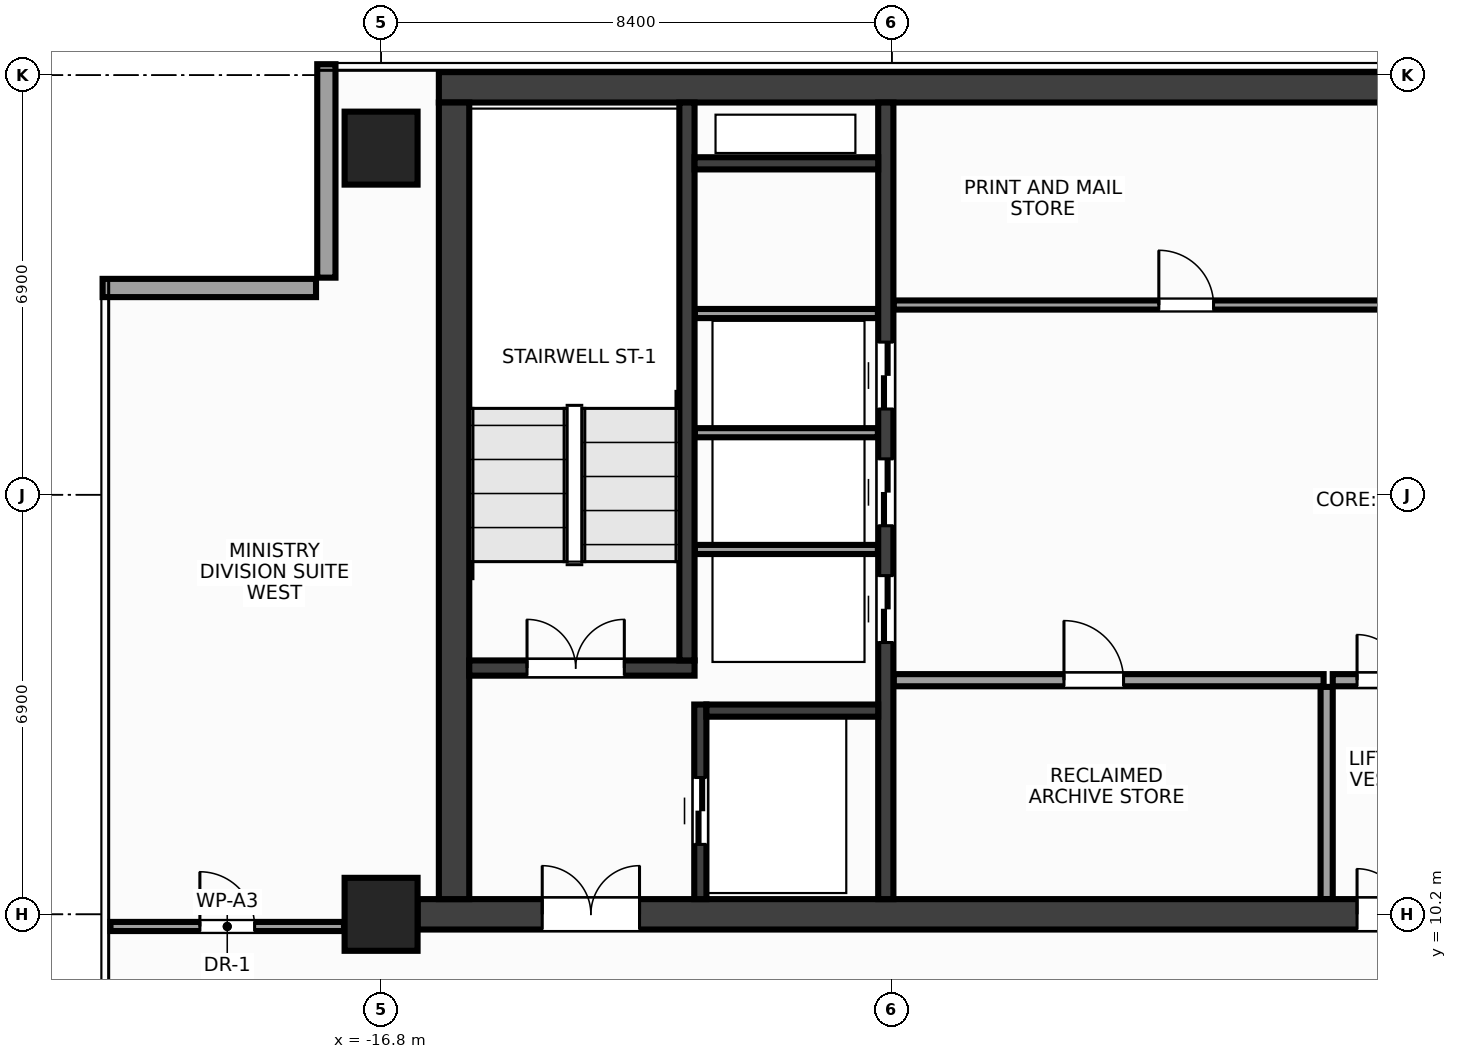
"""IFC4 building model, lengths in metres.
Left out: names, types, materials, properties, quantities, classifications, styles, units other than length and angle.
Written with IfcOpenShell. Run it as: python <this file> out.ifc"""

import sys

from ifc_helpers import new_model, si_unit, direction, frame, frame_2d, origin, origin_2d, place, context, subcontext, project, spatial, rectangle, extrude, source, transform, mapped, element, fill, save


model = new_model("IFC4")
c1 = context("Model", 3, precision=1e-05, world=origin(), true_north=direction((0.0, 1.0)))
c2 = subcontext(c1, "Body", "Model", "MODEL_VIEW")
j1 = project(units=[si_unit("LENGTHUNIT", "METRE"), si_unit("PLANEANGLEUNIT", "RADIAN")], contexts=[c1])
p1 = place(None, origin())
s1 = spatial("IfcSite", under=j1, at=p1, CompositionType="ELEMENT")
p2 = place(p1, origin())
s2 = spatial("IfcBuilding", under=s1, at=p2, CompositionType="ELEMENT")
p3 = place(p2, frame((0.0, 0.0, 282.8)))
s3 = spatial("IfcBuildingStorey", under=s2, at=p3, CompositionType="ELEMENT", Elevation=282.8)
m1 = source(origin(), c2, "Body", "SweptSolid", [
    extrude(rectangle(XDim=31.7, YDim=0.5, at=frame_2d((15.85, 0.0))), origin(), (0.0, 0.0, 1.0), 3.6),
])
p4 = place(p3, frame((-15.85, 23.8, 0.0), z_axis=(0.0, 0.0, 1.0), x_axis=(1.0, 0.0, 0.0)))
e1 = element("IfcWall", 1, at=p4, inside=s3, PredefinedType="SHEAR", context=c2, shape_type="MappedRepresentation", body=[
    mapped(m1, transform((0.0, 0.0, 0.0), x_axis=(1.0, 0.0, 0.0), y_axis=(0.0, 1.0, 0.0), z_axis=(0.0, 0.0, 1.0), scale=1.0)),
])
m2 = source(origin(), c2, "Body", "SweptSolid", [
    extrude(rectangle(XDim=32.4, YDim=0.5, at=frame_2d((16.2, 0.0))), origin(), (0.0, 0.0, 1.0), 3.6),
])
p5 = place(p3, frame((-16.2, 10.2, 0.0), z_axis=(0.0, 0.0, 1.0), x_axis=(1.0, 0.0, 0.0)))
e2 = element("IfcWall", 2, at=p5, inside=s3, PredefinedType="SHEAR", context=c2, shape_type="MappedRepresentation", body=[
    mapped(m2, transform((0.0, 0.0, 0.0), x_axis=(1.0, 0.0, 0.0), y_axis=(0.0, 1.0, 0.0), z_axis=(0.0, 0.0, 1.0), scale=1.0)),
])
p6 = place(p5, frame((2.05, 0.0, 0.0)))
e3 = element("IfcOpeningElement", 3, at=p6, cuts=e2, PredefinedType="OPENING", context=c2, shape_type="SweptSolid", body=[
    extrude(rectangle(XDim=1.6, YDim=2.15, at=frame_2d((0.8, 1.075))), frame((0.0, 0.262, 0.0), z_axis=(0.0, -1.0, 0.0), x_axis=(1.0, 0.0, 0.0)), (0.0, 0.0, 1.0), 0.524),
])
p7 = place(p5, frame((28.75, 0.0, 0.0)))
e4 = element("IfcOpeningElement", 4, at=p7, cuts=e2, PredefinedType="OPENING", context=c2, shape_type="SweptSolid", body=[
    extrude(rectangle(XDim=1.6, YDim=2.15, at=frame_2d((0.8, 1.075))), frame((0.0, 0.262, 0.0), z_axis=(0.0, -1.0, 0.0), x_axis=(1.0, 0.0, 0.0)), (0.0, 0.0, 1.0), 0.524),
])
p8 = place(p5, frame((15.45, 0.0, 0.0)))
e5 = element("IfcOpeningElement", 5, at=p8, cuts=e2, PredefinedType="OPENING", context=c2, shape_type="SweptSolid", body=[
    extrude(rectangle(XDim=1.5, YDim=2.2, at=frame_2d((0.75, 1.1))), frame((0.0, 0.262, 0.0), z_axis=(0.0, -1.0, 0.0), x_axis=(1.0, 0.0, 0.0)), (0.0, 0.0, 1.0), 0.524),
])
m3 = source(origin(), c2, "Body", "SweptSolid", [
    extrude(rectangle(XDim=13.1, YDim=0.5, at=frame_2d((6.55, 0.0))), origin(), (0.0, 0.0, 1.0), 3.6),
])
p9 = place(p3, frame((-15.6, 10.45, 0.0), z_axis=(0.0, 0.0, 1.0), x_axis=(0.0, 1.0, 0.0)))
e6 = element("IfcWall", 6, at=p9, inside=s3, PredefinedType="SHEAR", context=c2, shape_type="MappedRepresentation", body=[
    mapped(m3, transform((0.0, 0.0, 0.0), x_axis=(1.0, 0.0, 0.0), y_axis=(0.0, 1.0, 0.0), z_axis=(0.0, 0.0, 1.0), scale=1.0)),
])
m4 = source(origin(), c2, "Body", "SweptSolid", [
    extrude(rectangle(XDim=13.1, YDim=0.25, at=frame_2d((6.55, 0.0))), origin(), (0.0, 0.0, 1.0), 3.6),
])
p10 = place(p3, frame((-8.5, 10.45, 0.0), z_axis=(0.0, 0.0, 1.0), x_axis=(0.0, 1.0, 0.0)))
e7 = element("IfcWall", 7, at=p10, inside=s3, PredefinedType="SHEAR", context=c2, shape_type="MappedRepresentation", body=[
    mapped(m4, transform((0.0, 0.0, 0.0), x_axis=(1.0, 0.0, 0.0), y_axis=(0.0, 1.0, 0.0), z_axis=(0.0, 0.0, 1.0), scale=1.0)),
])
p11 = place(p10, frame((4.22, 0.0, 0.0)))
e8 = element("IfcOpeningElement", 8, at=p11, cuts=e7, PredefinedType="OPENING", context=c2, shape_type="SweptSolid", body=[
    extrude(rectangle(XDim=1.1, YDim=2.15, at=frame_2d((0.55, 1.075))), frame((0.0, 0.137, 0.0), z_axis=(0.0, -1.0, 0.0), x_axis=(1.0, 0.0, 0.0)), (0.0, 0.0, 1.0), 0.274),
])
p12 = place(p10, frame((6.14, 0.0, 0.0)))
e9 = element("IfcOpeningElement", 9, at=p12, cuts=e7, PredefinedType="OPENING", context=c2, shape_type="SweptSolid", body=[
    extrude(rectangle(XDim=1.1, YDim=2.15, at=frame_2d((0.55, 1.075))), frame((0.0, 0.137, 0.0), z_axis=(0.0, -1.0, 0.0), x_axis=(1.0, 0.0, 0.0)), (0.0, 0.0, 1.0), 0.274),
])
p13 = place(p10, frame((8.06, 0.0, 0.0)))
e10 = element("IfcOpeningElement", 10, at=p13, cuts=e7, PredefinedType="OPENING", context=c2, shape_type="SweptSolid", body=[
    extrude(rectangle(XDim=1.1, YDim=2.15, at=frame_2d((0.55, 1.075))), frame((0.0, 0.137, 0.0), z_axis=(0.0, -1.0, 0.0), x_axis=(1.0, 0.0, 0.0)), (0.0, 0.0, 1.0), 0.274),
])
m5 = source(origin(), c2, "Body", "SweptSolid", [
    extrude(rectangle(XDim=3.705, YDim=0.25, at=frame_2d((1.853, 0.0))), origin(), (0.0, 0.0, 1.0), 3.6),
])
p14 = place(p3, frame((-15.35, 14.25, 0.0), z_axis=(0.0, 0.0, 1.0), x_axis=(1.0, 0.0, 0.0)))
e11 = element("IfcWall", 11, at=p14, inside=s3, PredefinedType="SHEAR", context=c2, shape_type="MappedRepresentation", body=[
    mapped(m5, transform((0.0, 0.0, 0.0), x_axis=(1.0, 0.0, 0.0), y_axis=(0.0, 1.0, 0.0), z_axis=(0.0, 0.0, 1.0), scale=1.0)),
])
p15 = place(p14, frame((0.95, 0.0, 0.0)))
e12 = element("IfcOpeningElement", 12, at=p15, cuts=e11, PredefinedType="OPENING", context=c2, shape_type="SweptSolid", body=[
    extrude(rectangle(XDim=1.6, YDim=2.15, at=frame_2d((0.8, 1.075))), frame((0.0, 0.137, 0.0), z_axis=(0.0, -1.0, 0.0), x_axis=(1.0, 0.0, 0.0)), (0.0, 0.0, 1.0), 0.274),
])
m6 = source(origin(), c2, "Body", "SweptSolid", [
    extrude(rectangle(XDim=9.175, YDim=0.25, at=frame_2d((4.587, 0.0))), origin(), (0.0, 0.0, 1.0), 3.6),
])
p16 = place(p3, frame((-11.77, 14.375, 0.0), z_axis=(0.0, 0.0, 1.0), x_axis=(0.0, 1.0, 0.0)))
e13 = element("IfcWall", 13, at=p16, inside=s3, PredefinedType="SHEAR", context=c2, shape_type="MappedRepresentation", body=[
    mapped(m6, transform((0.0, 0.0, 0.0), x_axis=(1.0, 0.0, 0.0), y_axis=(0.0, 1.0, 0.0), z_axis=(0.0, 0.0, 1.0), scale=1.0)),
])
m7 = source(origin(), c2, "Body", "SweptSolid", [
    extrude(rectangle(XDim=3.2, YDim=0.2, at=frame_2d((1.6, 0.0))), origin(), (0.0, 0.0, 1.0), 3.6),
])
p17 = place(p3, frame((-11.55, 10.45, 0.0), z_axis=(0.0, 0.0, 1.0), x_axis=(0.0, 1.0, 0.0)))
e14 = element("IfcWall", 14, at=p17, inside=s3, PredefinedType="SHEAR", context=c2, shape_type="MappedRepresentation", body=[
    mapped(m7, transform((0.0, 0.0, 0.0), x_axis=(1.0, 0.0, 0.0), y_axis=(0.0, 1.0, 0.0), z_axis=(0.0, 0.0, 1.0), scale=1.0)),
])
p18 = place(p17, frame((0.9, 0.0, 0.0)))
e15 = element("IfcOpeningElement", 15, at=p18, cuts=e14, PredefinedType="OPENING", context=c2, shape_type="SweptSolid", body=[
    extrude(rectangle(XDim=1.1, YDim=2.15, at=frame_2d((0.55, 1.075))), frame((0.0, 0.112, 0.0), z_axis=(0.0, -1.0, 0.0), x_axis=(1.0, 0.0, 0.0)), (0.0, 0.0, 1.0), 0.224),
])
m8 = source(origin(), c2, "Body", "SweptSolid", [
    extrude(rectangle(XDim=2.825, YDim=0.2, at=frame_2d((1.413, 0.0))), origin(), (0.0, 0.0, 1.0), 3.6),
])
p19 = place(p3, frame((-11.45, 13.55, 0.0), z_axis=(0.0, 0.0, 1.0), x_axis=(1.0, 0.0, 0.0)))
e16 = element("IfcWall", 16, at=p19, inside=s3, PredefinedType="SHEAR", context=c2, shape_type="MappedRepresentation", body=[
    mapped(m8, transform((0.0, 0.0, 0.0), x_axis=(1.0, 0.0, 0.0), y_axis=(0.0, 1.0, 0.0), z_axis=(0.0, 0.0, 1.0), scale=1.0)),
])
m9 = source(origin(), c2, "Body", "SweptSolid", [
    extrude(rectangle(XDim=3.02, YDim=0.2, at=frame_2d((1.51, 0.0))), origin(), (0.0, 0.0, 1.0), 3.6),
])
p20 = place(p3, frame((-11.645, 22.55, 0.0), z_axis=(0.0, 0.0, 1.0), x_axis=(1.0, 0.0, 0.0)))
e17 = element("IfcWall", 17, at=p20, inside=s3, PredefinedType="SHEAR", context=c2, shape_type="MappedRepresentation", body=[
    mapped(m9, transform((0.0, 0.0, 0.0), x_axis=(1.0, 0.0, 0.0), y_axis=(0.0, 1.0, 0.0), z_axis=(0.0, 0.0, 1.0), scale=1.0)),
])
m10 = source(origin(), c2, "Body", "SweptSolid", [
    extrude(rectangle(XDim=1.2, YDim=1.2, at=origin_2d()), origin(), (0.0, 0.0, 1.0), 3.6),
])
for number, where, z_axis, x_axis in (
    (18, (-16.8, 10.2, 0.0), (0.0, 0.0, 1.0), (1.0, 0.0, 0.0)),
    (19, (-16.8, 22.8, 0.0), (0.0, 0.0, 1.0), (1.0, 0.0, 0.0)),
):
    element("IfcColumn", number, at=place(p3, frame(where, z_axis=z_axis, x_axis=x_axis)), inside=s3, PredefinedType="COLUMN", context=c2, shape_type="MappedRepresentation", body=[
        mapped(m10, transform((0.0, 0.0, 0.0), x_axis=(1.0, 0.0, 0.0), y_axis=(0.0, 1.0, 0.0), z_axis=(0.0, 0.0, 1.0), scale=1.0)),
    ])
m11 = source(origin(), c2, "Body", "SweptSolid", [
    extrude(rectangle(XDim=3.51, YDim=0.3, at=frame_2d((1.755, 0.0))), origin(), (0.0, 0.0, 1.0), 2.75),
])
p21 = place(p3, frame((-17.7, 24.18, 0.0), z_axis=(0.0, 0.0, 1.0), x_axis=(0.0, -1.0, 0.0)))
e20 = element("IfcWall", 20, at=p21, inside=s3, PredefinedType="STANDARD", context=c2, shape_type="MappedRepresentation", body=[
    mapped(m11, transform((0.0, 0.0, 0.0), x_axis=(1.0, 0.0, 0.0), y_axis=(0.0, 1.0, 0.0), z_axis=(0.0, 0.0, 1.0), scale=1.0)),
])
m12 = source(origin(), c2, "Body", "SweptSolid", [
    extrude(rectangle(XDim=3.51, YDim=0.3, at=frame_2d((1.755, 0.0))), origin(), (0.0, 0.0, 1.0), 2.75),
])
p22 = place(p3, frame((-17.87, 20.5, 0.0), z_axis=(0.0, 0.0, 1.0), x_axis=(-1.0, 0.0, 0.0)))
e21 = element("IfcWall", 21, at=p22, inside=s3, PredefinedType="STANDARD", context=c2, shape_type="MappedRepresentation", body=[
    mapped(m12, transform((0.0, 0.0, 0.0), x_axis=(1.0, 0.0, 0.0), y_axis=(0.0, 1.0, 0.0), z_axis=(0.0, 0.0, 1.0), scale=1.0)),
])
m13 = source(origin(), c2, "Body", "SweptSolid", [
    extrude(rectangle(XDim=3.01, YDim=0.15, at=frame_2d((1.505, 0.0))), origin(), (0.0, 0.0, 1.0), 3.37),
])
for number, where, z_axis, x_axis in (
    (22, (-11.64, 16.2, 0.0), (0.0, 0.0, 1.0), (1.0, 0.0, 0.0)),
    (23, (-11.64, 18.12, 0.0), (0.0, 0.0, 1.0), (1.0, 0.0, 0.0)),
    (24, (-11.64, 20.08, 0.0), (0.0, 0.0, 1.0), (1.0, 0.0, 0.0)),
):
    element("IfcWall", number, at=place(p3, frame(where, z_axis=z_axis, x_axis=x_axis)), inside=s3, PredefinedType="PARTITIONING", context=c2, shape_type="MappedRepresentation", body=[
        mapped(m13, transform((0.0, 0.0, 0.0), x_axis=(1.0, 0.0, 0.0), y_axis=(0.0, 1.0, 0.0), z_axis=(0.0, 0.0, 1.0), scale=1.0)),
    ])
m14 = source(origin(), c2, "Body", "SweptSolid", [
    extrude(rectangle(XDim=7.07, YDim=0.2, at=frame_2d((3.535, 0.0))), origin(), (0.0, 0.0, 1.0), 3.37),
])
p23 = place(p3, frame((-8.37, 14.05, 0.0), z_axis=(0.0, 0.0, 1.0), x_axis=(1.0, 0.0, 0.0)))
e25 = element("IfcWall", 25, at=p23, inside=s3, PredefinedType="PARTITIONING", context=c2, shape_type="MappedRepresentation", body=[
    mapped(m14, transform((0.0, 0.0, 0.0), x_axis=(1.0, 0.0, 0.0), y_axis=(0.0, 1.0, 0.0), z_axis=(0.0, 0.0, 1.0), scale=1.0)),
])
p24 = place(p23, frame((2.8, 0.0, 0.0)))
e26 = element("IfcOpeningElement", 26, at=p24, cuts=e25, PredefinedType="OPENING", context=c2, shape_type="SweptSolid", body=[
    extrude(rectangle(XDim=0.98, YDim=2.15, at=frame_2d((0.49, 1.075))), frame((0.0, 0.112, 0.0), z_axis=(0.0, -1.0, 0.0), x_axis=(1.0, 0.0, 0.0)), (0.0, 0.0, 1.0), 0.224),
])
m15 = source(origin(), c2, "Body", "SweptSolid", [
    extrude(rectangle(XDim=3.49, YDim=0.2, at=frame_2d((1.745, 0.0))), origin(), (0.0, 0.0, 1.0), 3.37),
])
p25 = place(p3, frame((-1.25, 10.45, 0.0), z_axis=(0.0, 0.0, 1.0), x_axis=(0.0, 1.0, 0.0)))
e27 = element("IfcWall", 27, at=p25, inside=s3, PredefinedType="PARTITIONING", context=c2, shape_type="MappedRepresentation", body=[
    mapped(m15, transform((0.0, 0.0, 0.0), x_axis=(1.0, 0.0, 0.0), y_axis=(0.0, 1.0, 0.0), z_axis=(0.0, 0.0, 1.0), scale=1.0)),
])
m16 = source(origin(), c2, "Body", "SweptSolid", [
    extrude(rectangle(XDim=2.3, YDim=0.2, at=frame_2d((1.15, 0.0))), origin(), (0.0, 0.0, 1.0), 3.37),
])
p26 = place(p3, frame((-1.15, 14.05, 0.0), z_axis=(0.0, 0.0, 1.0), x_axis=(1.0, 0.0, 0.0)))
e28 = element("IfcWall", 28, at=p26, inside=s3, PredefinedType="PARTITIONING", context=c2, shape_type="MappedRepresentation", body=[
    mapped(m16, transform((0.0, 0.0, 0.0), x_axis=(1.0, 0.0, 0.0), y_axis=(0.0, 1.0, 0.0), z_axis=(0.0, 0.0, 1.0), scale=1.0)),
])
p27 = place(p26, frame((0.4, 0.0, 0.0)))
e29 = element("IfcOpeningElement", 29, at=p27, cuts=e28, PredefinedType="OPENING", context=c2, shape_type="SweptSolid", body=[
    extrude(rectangle(XDim=1.5, YDim=2.2, at=frame_2d((0.75, 1.1))), frame((0.0, 0.112, 0.0), z_axis=(0.0, -1.0, 0.0), x_axis=(1.0, 0.0, 0.0)), (0.0, 0.0, 1.0), 0.224),
])
m17 = source(origin(), c2, "Body", "SweptSolid", [
    extrude(rectangle(XDim=14.59, YDim=0.15, at=frame_2d((7.295, 0.0))), origin(), (0.0, 0.0, 1.0), 3.37),
])
p28 = place(p3, frame((-8.37, 20.22, 0.0), z_axis=(0.0, 0.0, 1.0), x_axis=(1.0, 0.0, 0.0)))
e30 = element("IfcWall", 30, at=p28, inside=s3, PredefinedType="PARTITIONING", context=c2, shape_type="MappedRepresentation", body=[
    mapped(m17, transform((0.0, 0.0, 0.0), x_axis=(1.0, 0.0, 0.0), y_axis=(0.0, 1.0, 0.0), z_axis=(0.0, 0.0, 1.0), scale=1.0)),
])
p29 = place(p28, frame((4.36, 0.0, 0.0)))
e31 = element("IfcOpeningElement", 31, at=p29, cuts=e30, PredefinedType="OPENING", context=c2, shape_type="SweptSolid", body=[
    extrude(rectangle(XDim=0.9, YDim=2.15, at=frame_2d((0.45, 1.075))), frame((0.0, 0.087, 0.0), z_axis=(0.0, -1.0, 0.0), x_axis=(1.0, 0.0, 0.0)), (0.0, 0.0, 1.0), 0.174),
])
p30 = place(p28, frame((10.32, 0.0, 0.0)))
e32 = element("IfcOpeningElement", 32, at=p30, cuts=e30, PredefinedType="OPENING", context=c2, shape_type="SweptSolid", body=[
    extrude(rectangle(XDim=0.9, YDim=2.15, at=frame_2d((0.45, 1.075))), frame((0.0, 0.087, 0.0), z_axis=(0.0, -1.0, 0.0), x_axis=(1.0, 0.0, 0.0)), (0.0, 0.0, 1.0), 0.174),
])
p31 = place(p28, frame((12.77, 0.0, 0.0)))
e33 = element("IfcOpeningElement", 33, at=p31, cuts=e30, PredefinedType="OPENING", context=c2, shape_type="SweptSolid", body=[
    extrude(rectangle(XDim=0.9, YDim=2.15, at=frame_2d((0.45, 1.075))), frame((0.0, 0.087, 0.0), z_axis=(0.0, -1.0, 0.0), x_axis=(1.0, 0.0, 0.0)), (0.0, 0.0, 1.0), 0.174),
])
m18 = source(origin(), c2, "Body", "SweptSolid", [
    extrude(rectangle(XDim=3.84, YDim=0.15, at=frame_2d((1.92, 0.0))), origin(), (0.0, 0.0, 1.0), 2.805),
])
p32 = place(p3, frame((-21.25, 10.0, 0.0), z_axis=(0.0, 0.0, 1.0), x_axis=(1.0, 0.0, 0.0)))
e34 = element("IfcWall", 34, at=p32, inside=s3, PredefinedType="PARTITIONING", context=c2, shape_type="MappedRepresentation", body=[
    mapped(m18, transform((0.0, 0.0, 0.0), x_axis=(1.0, 0.0, 0.0), y_axis=(0.0, 1.0, 0.0), z_axis=(0.0, 0.0, 1.0), scale=1.0)),
])
p33 = place(p32, frame((1.47, 0.0, 0.0)))
e35 = element("IfcOpeningElement", 35, at=p33, cuts=e34, PredefinedType="OPENING", context=c2, shape_type="SweptSolid", body=[
    extrude(rectangle(XDim=0.9, YDim=2.15, at=frame_2d((0.45, 1.075))), frame((0.0, 0.087, 0.0), z_axis=(0.0, -1.0, 0.0), x_axis=(1.0, 0.0, 0.0)), (0.0, 0.0, 1.0), 0.174),
])
m19 = source(origin(), c2, "Body", "SweptSolid", [
    extrude(rectangle(XDim=1.6, YDim=2.15, at=frame_2d((0.8, 1.075))), frame((0.0, 0.025, 0.0), z_axis=(0.0, -1.0, 0.0), x_axis=(1.0, 0.0, 0.0)), (0.0, 0.0, 1.0), 0.05),
])
p34 = place(p15, origin())
e36 = element("IfcDoor", 36, at=p34, inside=s3, OperationType="DOUBLE_DOOR_SINGLE_SWING", PredefinedType="DOOR", context=c2, shape_type="MappedRepresentation", body=[
    mapped(m19, transform((0.0, 0.0, 0.0), x_axis=(1.0, 0.0, 0.0), y_axis=(0.0, 1.0, 0.0), z_axis=(0.0, 0.0, 1.0), scale=1.0)),
])
fill(e12, e36)
p35 = place(p6, origin())
e37 = element("IfcDoor", 37, at=p35, inside=s3, OperationType="DOUBLE_DOOR_SINGLE_SWING", PredefinedType="DOOR", context=c2, shape_type="MappedRepresentation", body=[
    mapped(m19, transform((0.0, 0.0, 0.0), x_axis=(1.0, 0.0, 0.0), y_axis=(0.0, 1.0, 0.0), z_axis=(0.0, 0.0, 1.0), scale=1.0)),
])
fill(e3, e37)
m20 = source(origin(), c2, "Body", "SweptSolid", [
    extrude(rectangle(XDim=1.1, YDim=2.15, at=frame_2d((0.55, 1.075))), frame((0.0, 0.025, 0.0), z_axis=(0.0, -1.0, 0.0), x_axis=(1.0, 0.0, 0.0)), (0.0, 0.0, 1.0), 0.05),
])
p36 = place(p18, origin())
e38 = element("IfcDoor", 38, at=p36, inside=s3, OperationType="DOUBLE_DOOR_SLIDING", PredefinedType="DOOR", context=c2, shape_type="MappedRepresentation", body=[
    mapped(m20, transform((0.0, 0.0, 0.0), x_axis=(1.0, 0.0, 0.0), y_axis=(0.0, 1.0, 0.0), z_axis=(0.0, 0.0, 1.0), scale=1.0)),
])
fill(e15, e38)
p37 = place(p11, origin())
e39 = element("IfcDoor", 39, at=p37, inside=s3, OperationType="DOUBLE_DOOR_SLIDING", PredefinedType="DOOR", context=c2, shape_type="MappedRepresentation", body=[
    mapped(m20, transform((0.0, 0.0, 0.0), x_axis=(1.0, 0.0, 0.0), y_axis=(0.0, 1.0, 0.0), z_axis=(0.0, 0.0, 1.0), scale=1.0)),
])
fill(e8, e39)
p38 = place(p12, origin())
e40 = element("IfcDoor", 40, at=p38, inside=s3, OperationType="DOUBLE_DOOR_SLIDING", PredefinedType="DOOR", context=c2, shape_type="MappedRepresentation", body=[
    mapped(m20, transform((0.0, 0.0, 0.0), x_axis=(1.0, 0.0, 0.0), y_axis=(0.0, 1.0, 0.0), z_axis=(0.0, 0.0, 1.0), scale=1.0)),
])
fill(e9, e40)
p39 = place(p13, origin())
e41 = element("IfcDoor", 41, at=p39, inside=s3, OperationType="DOUBLE_DOOR_SLIDING", PredefinedType="DOOR", context=c2, shape_type="MappedRepresentation", body=[
    mapped(m20, transform((0.0, 0.0, 0.0), x_axis=(1.0, 0.0, 0.0), y_axis=(0.0, 1.0, 0.0), z_axis=(0.0, 0.0, 1.0), scale=1.0)),
])
fill(e10, e41)
m21 = source(origin(), c2, "Body", "SweptSolid", [
    extrude(rectangle(XDim=0.98, YDim=2.15, at=frame_2d((0.49, 1.075))), frame((0.0, 0.025, 0.0), z_axis=(0.0, -1.0, 0.0), x_axis=(1.0, 0.0, 0.0)), (0.0, 0.0, 1.0), 0.05),
])
p40 = place(p24, origin())
e42 = element("IfcDoor", 42, at=p40, inside=s3, OperationType="SINGLE_SWING_LEFT", PredefinedType="DOOR", context=c2, shape_type="MappedRepresentation", body=[
    mapped(m21, transform((0.0, 0.0, 0.0), x_axis=(1.0, 0.0, 0.0), y_axis=(0.0, 1.0, 0.0), z_axis=(0.0, 0.0, 1.0), scale=1.0)),
])
fill(e26, e42)
m22 = source(origin(), c2, "Body", "SweptSolid", [
    extrude(rectangle(XDim=1.5, YDim=2.2, at=frame_2d((0.75, 1.1))), frame((0.0, 0.025, 0.0), z_axis=(0.0, -1.0, 0.0), x_axis=(1.0, 0.0, 0.0)), (0.0, 0.0, 1.0), 0.05),
])
p41 = place(p27, origin())
e43 = element("IfcDoor", 43, at=p41, inside=s3, OperationType="DOUBLE_DOOR_SINGLE_SWING", PredefinedType="DOOR", context=c2, shape_type="MappedRepresentation", body=[
    mapped(m22, transform((0.0, 0.0, 0.0), x_axis=(1.0, 0.0, 0.0), y_axis=(0.0, 1.0, 0.0), z_axis=(0.0, 0.0, 1.0), scale=1.0)),
])
fill(e29, e43)
p42 = place(p8, origin())
e44 = element("IfcDoor", 44, at=p42, inside=s3, OperationType="DOUBLE_DOOR_SINGLE_SWING", PredefinedType="DOOR", context=c2, shape_type="MappedRepresentation", body=[
    mapped(m22, transform((0.0, 0.0, 0.0), x_axis=(1.0, 0.0, 0.0), y_axis=(0.0, 1.0, 0.0), z_axis=(0.0, 0.0, 1.0), scale=1.0)),
])
fill(e5, e44)
m23 = source(origin(), c2, "Body", "SweptSolid", [
    extrude(rectangle(XDim=0.9, YDim=2.15, at=frame_2d((0.45, 1.075))), frame((0.0, 0.025, 0.0), z_axis=(0.0, -1.0, 0.0), x_axis=(1.0, 0.0, 0.0)), (0.0, 0.0, 1.0), 0.05),
])
p43 = place(p29, origin())
e45 = element("IfcDoor", 45, at=p43, inside=s3, OperationType="SINGLE_SWING_LEFT", PredefinedType="DOOR", context=c2, shape_type="MappedRepresentation", body=[
    mapped(m23, transform((0.0, 0.0, 0.0), x_axis=(1.0, 0.0, 0.0), y_axis=(0.0, 1.0, 0.0), z_axis=(0.0, 0.0, 1.0), scale=1.0)),
])
fill(e31, e45)
p44 = place(p33, origin())
e46 = element("IfcDoor", 46, at=p44, inside=s3, OperationType="SINGLE_SWING_LEFT", PredefinedType="DOOR", context=c2, shape_type="MappedRepresentation", body=[
    mapped(m23, transform((0.0, 0.0, 0.0), x_axis=(1.0, 0.0, 0.0), y_axis=(0.0, 1.0, 0.0), z_axis=(0.0, 0.0, 1.0), scale=1.0)),
])
fill(e35, e46)
save(model, sys.argv[1])
